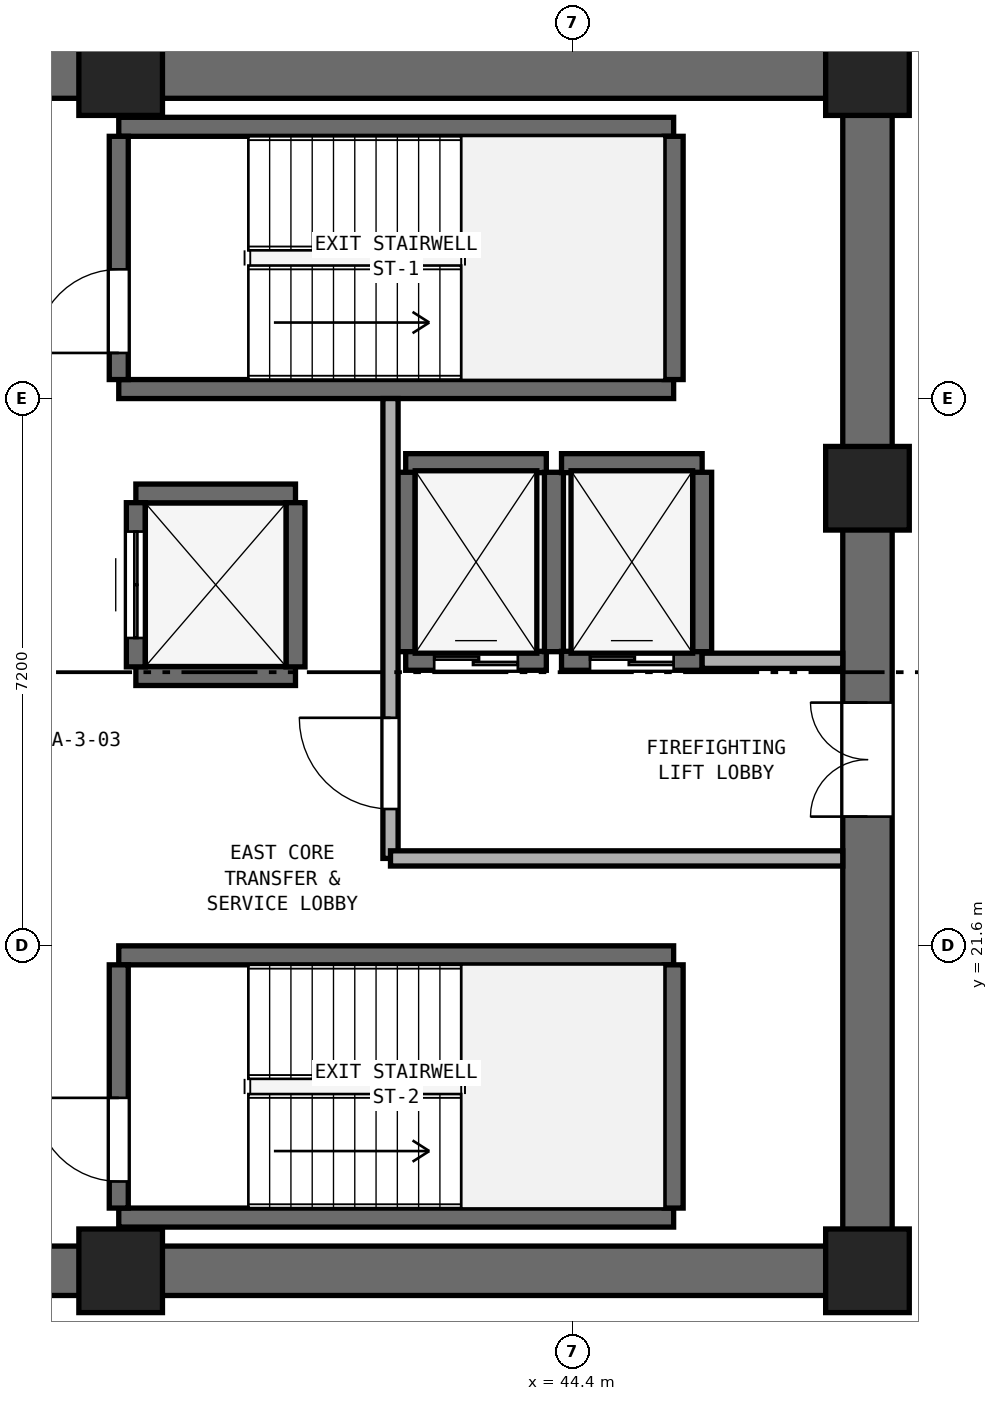
"""IFC4 building model, lengths in metres.
Left out: names, types, materials, properties, quantities, classifications, styles, units other than length and angle.
Written with IfcOpenShell. Run it as: python <this file> out.ifc"""

import sys

from ifc_helpers import new_model, si_unit, direction, frame, frame_2d, origin, origin_2d, place, context, subcontext, project, spatial, rectangle, extrude, element, fill, save


model = new_model("IFC4")
c1 = context("Model", 3, precision=1e-05, world=origin(), true_north=direction((0.0, 1.0)))
c2 = subcontext(c1, "Body", "Model", "MODEL_VIEW")
j1 = project(units=[si_unit("LENGTHUNIT", "METRE"), si_unit("PLANEANGLEUNIT", "RADIAN")], contexts=[c1])
p1 = place(None, origin())
s1 = spatial("IfcSite", under=j1, at=p1, CompositionType="ELEMENT")
p2 = place(p1, origin())
s2 = spatial("IfcBuilding", under=s1, at=p2, CompositionType="ELEMENT")
p3 = place(p2, frame((0.0, 0.0, 63.0)))
s3 = spatial("IfcBuildingStorey", under=s2, at=p3, CompositionType="ELEMENT", Elevation=63.0)
for number, where, z_axis, x_axis in (
    (1, (25.4, 17.325, 0.0), (0.0, 0.0, 1.0), (1.0, 0.0, 0.0)),
    (2, (25.4, 33.075, 0.0), (0.0, 0.0, 1.0), (1.0, 0.0, 0.0)),
):
    element("IfcWall", number, at=place(p3, frame(where, z_axis=z_axis, x_axis=x_axis)), inside=s3, PredefinedType="SHEAR", context=c2, shape_type="SweptSolid", body=[
        extrude(rectangle(XDim=23.2, YDim=0.65, at=frame_2d((11.6, 0.0))), origin(), (0.0, 0.0, 1.0), 3.525),
    ])
p4 = place(p3, frame((48.275, 17.65, 0.0), z_axis=(0.0, 0.0, 1.0), x_axis=(0.0, 1.0, 0.0)))
e3 = element("IfcWall", 3, at=p4, inside=s3, PredefinedType="SHEAR", context=c2, shape_type="SweptSolid", body=[
    extrude(rectangle(XDim=15.1, YDim=0.65, at=frame_2d((7.55, 0.0))), origin(), (0.0, 0.0, 1.0), 3.525),
])
p5 = place(p4, frame((5.65, 0.0, 0.0)))
e4 = element("IfcOpeningElement", 4, at=p5, cuts=e3, PredefinedType="OPENING", context=c2, shape_type="SweptSolid", body=[
    extrude(rectangle(XDim=1.5, YDim=2.15, at=frame_2d((0.75, 1.075))), frame((0.0, 0.335, 0.0), z_axis=(0.0, -1.0, 0.0), x_axis=(1.0, 0.0, 0.0)), (0.0, 0.0, 1.0), 0.67),
])
for number, where, z_axis, x_axis in (
    (5, (38.45, 17.325, 0.0), (0.0, 0.0, 1.0), (1.0, 0.0, 0.0)),
    (6, (48.275, 17.325, 0.0), (0.0, 0.0, 1.0), (1.0, 0.0, 0.0)),
    (7, (48.275, 27.62, 0.0), (0.0, 0.0, 1.0), (1.0, 0.0, 0.0)),
    (8, (48.275, 33.075, 0.0), (0.0, 0.0, 1.0), (1.0, 0.0, 0.0)),
    (9, (38.45, 33.075, 0.0), (0.0, 0.0, 1.0), (1.0, 0.0, 0.0)),
):
    element("IfcColumn", number, at=place(p3, frame(where, z_axis=z_axis, x_axis=x_axis)), inside=s3, PredefinedType="PILASTER", context=c2, shape_type="SweptSolid", body=[
        extrude(rectangle(XDim=1.1, YDim=1.1, at=origin_2d()), origin(), (0.0, 0.0, 1.0), 3.8),
    ])
for number, where, z_axis, x_axis in (
    (10, (38.425, 28.925, 0.0), (0.0, 0.0, 1.0), (1.0, 0.0, 0.0)),
    (11, (38.425, 32.375, 0.0), (0.0, 0.0, 1.0), (1.0, 0.0, 0.0)),
):
    element("IfcWall", number, at=place(p3, frame(where, z_axis=z_axis, x_axis=x_axis)), inside=s3, PredefinedType="SHEAR", context=c2, shape_type="SweptSolid", body=[
        extrude(rectangle(XDim=7.3, YDim=0.25, at=frame_2d((3.65, 0.0))), origin(), (0.0, 0.0, 1.0), 3.525),
    ])
p6 = place(p3, frame((38.425, 29.05, 0.0), z_axis=(0.0, 0.0, 1.0), x_axis=(0.0, 1.0, 0.0)))
e12 = element("IfcWall", 12, at=p6, inside=s3, PredefinedType="SHEAR", context=c2, shape_type="SweptSolid", body=[
    extrude(rectangle(XDim=3.2, YDim=0.25, at=frame_2d((1.6, 0.0))), origin(), (0.0, 0.0, 1.0), 3.525),
])
p7 = place(p6, frame((0.35, 0.0, 0.0)))
e13 = element("IfcOpeningElement", 13, at=p7, cuts=e12, PredefinedType="OPENING", context=c2, shape_type="SweptSolid", body=[
    extrude(rectangle(XDim=1.1, YDim=2.15, at=frame_2d((0.55, 1.075))), frame((0.0, 0.135, 0.0), z_axis=(0.0, -1.0, 0.0), x_axis=(1.0, 0.0, 0.0)), (0.0, 0.0, 1.0), 0.27),
])
p8 = place(p3, frame((45.725, 29.05, 0.0), z_axis=(0.0, 0.0, 1.0), x_axis=(0.0, 1.0, 0.0)))
e14 = element("IfcWall", 14, at=p8, inside=s3, PredefinedType="SHEAR", context=c2, shape_type="SweptSolid", body=[
    extrude(rectangle(XDim=3.2, YDim=0.25, at=frame_2d((1.6, 0.0))), origin(), (0.0, 0.0, 1.0), 3.525),
])
for number, where, z_axis, x_axis in (
    (15, (38.425, 18.025, 0.0), (0.0, 0.0, 1.0), (1.0, 0.0, 0.0)),
    (16, (38.425, 21.475, 0.0), (0.0, 0.0, 1.0), (1.0, 0.0, 0.0)),
):
    element("IfcWall", number, at=place(p3, frame(where, z_axis=z_axis, x_axis=x_axis)), inside=s3, PredefinedType="SHEAR", context=c2, shape_type="SweptSolid", body=[
        extrude(rectangle(XDim=7.3, YDim=0.25, at=frame_2d((3.65, 0.0))), origin(), (0.0, 0.0, 1.0), 3.525),
    ])
p9 = place(p3, frame((38.425, 18.15, 0.0), z_axis=(0.0, 0.0, 1.0), x_axis=(0.0, 1.0, 0.0)))
e17 = element("IfcWall", 17, at=p9, inside=s3, PredefinedType="SHEAR", context=c2, shape_type="SweptSolid", body=[
    extrude(rectangle(XDim=3.2, YDim=0.25, at=frame_2d((1.6, 0.0))), origin(), (0.0, 0.0, 1.0), 3.525),
])
p10 = place(p9, frame((0.35, 0.0, 0.0)))
e18 = element("IfcOpeningElement", 18, at=p10, cuts=e17, PredefinedType="OPENING", context=c2, shape_type="SweptSolid", body=[
    extrude(rectangle(XDim=1.1, YDim=2.15, at=frame_2d((0.55, 1.075))), frame((0.0, 0.135, 0.0), z_axis=(0.0, -1.0, 0.0), x_axis=(1.0, 0.0, 0.0)), (0.0, 0.0, 1.0), 0.27),
])
p11 = place(p3, frame((45.725, 18.15, 0.0), z_axis=(0.0, 0.0, 1.0), x_axis=(0.0, 1.0, 0.0)))
e19 = element("IfcWall", 19, at=p11, inside=s3, PredefinedType="SHEAR", context=c2, shape_type="SweptSolid", body=[
    extrude(rectangle(XDim=3.2, YDim=0.25, at=frame_2d((1.6, 0.0))), origin(), (0.0, 0.0, 1.0), 3.525),
])
p12 = place(p3, frame((42.2, 25.35, 0.0), z_axis=(0.0, 0.0, 1.0), x_axis=(1.0, 0.0, 0.0)))
e20 = element("IfcWall", 20, at=p12, inside=s3, PredefinedType="SHEAR", context=c2, shape_type="SweptSolid", body=[
    extrude(rectangle(XDim=1.85, YDim=0.25, at=frame_2d((0.925, 0.0))), origin(), (0.0, 0.0, 1.0), 3.525),
])
p13 = place(p12, frame((0.375, 0.0, 0.0)))
e21 = element("IfcOpeningElement", 21, at=p13, cuts=e20, PredefinedType="OPENING", context=c2, shape_type="SweptSolid", body=[
    extrude(rectangle(XDim=1.1, YDim=2.15, at=frame_2d((0.55, 1.075))), frame((0.0, 0.135, 0.0), z_axis=(0.0, -1.0, 0.0), x_axis=(1.0, 0.0, 0.0)), (0.0, 0.0, 1.0), 0.27),
])
p14 = place(p3, frame((42.2, 27.95, 0.0), z_axis=(0.0, 0.0, 1.0), x_axis=(1.0, 0.0, 0.0)))
e22 = element("IfcWall", 22, at=p14, inside=s3, PredefinedType="SHEAR", context=c2, shape_type="SweptSolid", body=[
    extrude(rectangle(XDim=1.85, YDim=0.25, at=frame_2d((0.925, 0.0))), origin(), (0.0, 0.0, 1.0), 3.525),
])
for number, where, z_axis, x_axis in (
    (23, (42.2, 25.47, 0.0), (0.0, 0.0, 1.0), (0.0, 1.0, 0.0)),
    (24, (44.15, 25.47, 0.0), (0.0, 0.0, 1.0), (0.0, 1.0, 0.0)),
):
    element("IfcWall", number, at=place(p3, frame(where, z_axis=z_axis, x_axis=x_axis)), inside=s3, PredefinedType="SHEAR", context=c2, shape_type="SweptSolid", body=[
        extrude(rectangle(XDim=2.36, YDim=0.25, at=frame_2d((1.18, 0.0))), origin(), (0.0, 0.0, 1.0), 3.525),
    ])
p15 = place(p3, frame((44.25, 25.35, 0.0), z_axis=(0.0, 0.0, 1.0), x_axis=(1.0, 0.0, 0.0)))
e25 = element("IfcWall", 25, at=p15, inside=s3, PredefinedType="SHEAR", context=c2, shape_type="SweptSolid", body=[
    extrude(rectangle(XDim=1.85, YDim=0.25, at=frame_2d((0.925, 0.0))), origin(), (0.0, 0.0, 1.0), 3.525),
])
p16 = place(p15, frame((0.375, 0.0, 0.0)))
e26 = element("IfcOpeningElement", 26, at=p16, cuts=e25, PredefinedType="OPENING", context=c2, shape_type="SweptSolid", body=[
    extrude(rectangle(XDim=1.1, YDim=2.15, at=frame_2d((0.55, 1.075))), frame((0.0, 0.135, 0.0), z_axis=(0.0, -1.0, 0.0), x_axis=(1.0, 0.0, 0.0)), (0.0, 0.0, 1.0), 0.27),
])
p17 = place(p3, frame((44.25, 27.95, 0.0), z_axis=(0.0, 0.0, 1.0), x_axis=(1.0, 0.0, 0.0)))
e27 = element("IfcWall", 27, at=p17, inside=s3, PredefinedType="SHEAR", context=c2, shape_type="SweptSolid", body=[
    extrude(rectangle(XDim=1.85, YDim=0.25, at=frame_2d((0.925, 0.0))), origin(), (0.0, 0.0, 1.0), 3.525),
])
p18 = place(p3, frame((46.1, 25.47, 0.0), z_axis=(0.0, 0.0, 1.0), x_axis=(0.0, 1.0, 0.0)))
e28 = element("IfcWall", 28, at=p18, inside=s3, PredefinedType="SHEAR", context=c2, shape_type="SweptSolid", body=[
    extrude(rectangle(XDim=2.36, YDim=0.25, at=frame_2d((1.18, 0.0))), origin(), (0.0, 0.0, 1.0), 3.525),
])
for number, where, z_axis, x_axis in (
    (29, (38.65, 25.15, 0.0), (0.0, 0.0, 1.0), (1.0, 0.0, 0.0)),
    (30, (38.65, 27.55, 0.0), (0.0, 0.0, 1.0), (1.0, 0.0, 0.0)),
):
    element("IfcWall", number, at=place(p3, frame(where, z_axis=z_axis, x_axis=x_axis)), inside=s3, PredefinedType="SHEAR", context=c2, shape_type="SweptSolid", body=[
        extrude(rectangle(XDim=2.1, YDim=0.25, at=frame_2d((1.05, 0.0))), origin(), (0.0, 0.0, 1.0), 3.525),
    ])
p19 = place(p3, frame((38.65, 25.27, 0.0), z_axis=(0.0, 0.0, 1.0), x_axis=(0.0, 1.0, 0.0)))
e31 = element("IfcWall", 31, at=p19, inside=s3, PredefinedType="SHEAR", context=c2, shape_type="SweptSolid", body=[
    extrude(rectangle(XDim=2.16, YDim=0.25, at=frame_2d((1.08, 0.0))), origin(), (0.0, 0.0, 1.0), 3.525),
])
p20 = place(p19, frame((0.38, 0.0, 0.0)))
e32 = element("IfcOpeningElement", 32, at=p20, cuts=e31, PredefinedType="OPENING", context=c2, shape_type="SweptSolid", body=[
    extrude(rectangle(XDim=1.4, YDim=2.2, at=frame_2d((0.7, 1.1))), frame((0.0, 0.135, 0.0), z_axis=(0.0, -1.0, 0.0), x_axis=(1.0, 0.0, 0.0)), (0.0, 0.0, 1.0), 0.27),
])
p21 = place(p3, frame((40.75, 25.27, 0.0), z_axis=(0.0, 0.0, 1.0), x_axis=(0.0, 1.0, 0.0)))
e33 = element("IfcWall", 33, at=p21, inside=s3, PredefinedType="SHEAR", context=c2, shape_type="SweptSolid", body=[
    extrude(rectangle(XDim=2.16, YDim=0.25, at=frame_2d((1.08, 0.0))), origin(), (0.0, 0.0, 1.0), 3.525),
])
p22 = place(p3, frame((42.0, 22.75, 0.0), z_axis=(0.0, 0.0, 1.0), x_axis=(0.0, 1.0, 0.0)))
e34 = element("IfcWall", 34, at=p22, inside=s3, PredefinedType="SOLIDWALL", context=c2, shape_type="SweptSolid", body=[
    extrude(rectangle(XDim=6.05, YDim=0.2, at=frame_2d((3.025, 0.0))), origin(), (0.0, 0.0, 1.0), 3.525),
])
p23 = place(p22, frame((0.65, 0.0, 0.0)))
e35 = element("IfcOpeningElement", 35, at=p23, cuts=e34, PredefinedType="OPENING", context=c2, shape_type="SweptSolid", body=[
    extrude(rectangle(XDim=1.2, YDim=2.15, at=frame_2d((0.6, 1.075))), frame((0.0, 0.11, 0.0), z_axis=(0.0, -1.0, 0.0), x_axis=(1.0, 0.0, 0.0)), (0.0, 0.0, 1.0), 0.22),
])
p24 = place(p3, frame((42.0, 22.75, 0.0), z_axis=(0.0, 0.0, 1.0), x_axis=(1.0, 0.0, 0.0)))
e36 = element("IfcWall", 36, at=p24, inside=s3, PredefinedType="SOLIDWALL", context=c2, shape_type="SweptSolid", body=[
    extrude(rectangle(XDim=5.95, YDim=0.2, at=frame_2d((2.975, 0.0))), origin(), (0.0, 0.0, 1.0), 3.525),
])
p25 = place(p3, frame((46.1, 25.35, 0.0), z_axis=(0.0, 0.0, 1.0), x_axis=(1.0, 0.0, 0.0)))
e37 = element("IfcWall", 37, at=p25, inside=s3, PredefinedType="SOLIDWALL", context=c2, shape_type="SweptSolid", body=[
    extrude(rectangle(XDim=1.85, YDim=0.2, at=frame_2d((0.925, 0.0))), origin(), (0.0, 0.0, 1.0), 3.525),
])
p26 = place(p7, origin())
e38 = element("IfcDoor", 38, at=p26, inside=s3, OperationType="SINGLE_SWING_LEFT", PredefinedType="DOOR", context=c2, shape_type="SweptSolid", body=[
    extrude(rectangle(XDim=1.1, YDim=2.15, at=frame_2d((0.55, 1.075))), frame((0.0, 0.025, 0.0), z_axis=(0.0, -1.0, 0.0), x_axis=(1.0, 0.0, 0.0)), (0.0, 0.0, 1.0), 0.05),
])
fill(e13, e38)
p27 = place(p10, origin())
e39 = element("IfcDoor", 39, at=p27, inside=s3, OperationType="SINGLE_SWING_RIGHT", PredefinedType="DOOR", context=c2, shape_type="SweptSolid", body=[
    extrude(rectangle(XDim=1.1, YDim=2.15, at=frame_2d((0.55, 1.075))), frame((0.0, 0.025, 0.0), z_axis=(0.0, -1.0, 0.0), x_axis=(1.0, 0.0, 0.0)), (0.0, 0.0, 1.0), 0.05),
])
fill(e18, e39)
p28 = place(p13, origin())
e40 = element("IfcDoor", 40, at=p28, inside=s3, OperationType="DOUBLE_DOOR_SLIDING", PredefinedType="DOOR", context=c2, shape_type="SweptSolid", body=[
    extrude(rectangle(XDim=1.1, YDim=2.15, at=frame_2d((0.55, 1.075))), frame((0.0, 0.025, 0.0), z_axis=(0.0, -1.0, 0.0), x_axis=(1.0, 0.0, 0.0)), (0.0, 0.0, 1.0), 0.05),
])
fill(e21, e40)
p29 = place(p16, origin())
e41 = element("IfcDoor", 41, at=p29, inside=s3, OperationType="DOUBLE_DOOR_SLIDING", PredefinedType="DOOR", context=c2, shape_type="SweptSolid", body=[
    extrude(rectangle(XDim=1.1, YDim=2.15, at=frame_2d((0.55, 1.075))), frame((0.0, 0.025, 0.0), z_axis=(0.0, -1.0, 0.0), x_axis=(1.0, 0.0, 0.0)), (0.0, 0.0, 1.0), 0.05),
])
fill(e26, e41)
p30 = place(p20, origin())
e42 = element("IfcDoor", 42, at=p30, inside=s3, OperationType="DOUBLE_DOOR_SLIDING", PredefinedType="DOOR", context=c2, shape_type="SweptSolid", body=[
    extrude(rectangle(XDim=1.4, YDim=2.2, at=frame_2d((0.7, 1.1))), frame((0.0, 0.025, 0.0), z_axis=(0.0, -1.0, 0.0), x_axis=(1.0, 0.0, 0.0)), (0.0, 0.0, 1.0), 0.05),
])
fill(e32, e42)
p31 = place(p23, origin())
e43 = element("IfcDoor", 43, at=p31, inside=s3, OperationType="SINGLE_SWING_RIGHT", PredefinedType="DOOR", context=c2, shape_type="SweptSolid", body=[
    extrude(rectangle(XDim=1.2, YDim=2.15, at=frame_2d((0.6, 1.075))), frame((0.0, 0.025, 0.0), z_axis=(0.0, -1.0, 0.0), x_axis=(1.0, 0.0, 0.0)), (0.0, 0.0, 1.0), 0.05),
])
fill(e35, e43)
p32 = place(p5, origin())
e44 = element("IfcDoor", 44, at=p32, inside=s3, OperationType="DOUBLE_DOOR_SINGLE_SWING", PredefinedType="DOOR", context=c2, shape_type="SweptSolid", body=[
    extrude(rectangle(XDim=1.5, YDim=2.15, at=frame_2d((0.75, 1.075))), frame((0.0, 0.025, 0.0), z_axis=(0.0, -1.0, 0.0), x_axis=(1.0, 0.0, 0.0)), (0.0, 0.0, 1.0), 0.05),
])
fill(e4, e44)
save(model, sys.argv[1])
